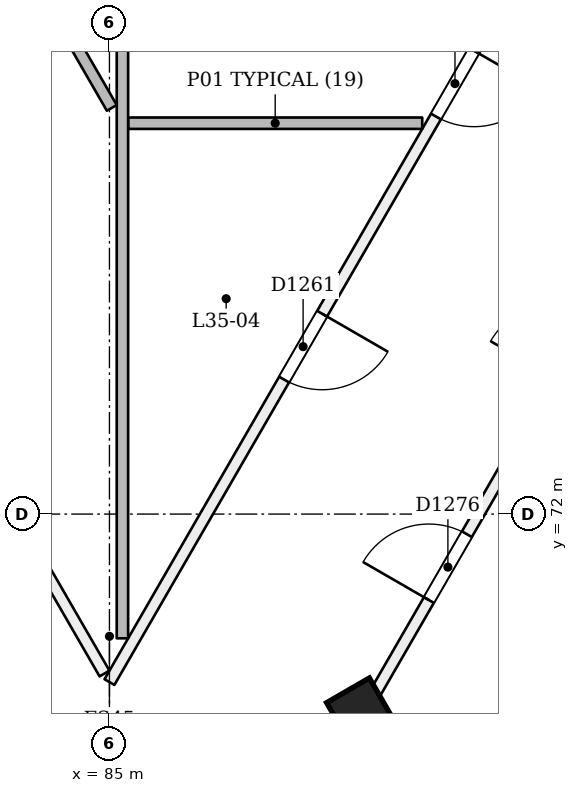
"""IFC4 building model, lengths in metres.
Left out: names, types, materials, properties, quantities, classifications, styles, units other than length and angle.
Written with IfcOpenShell. Run it as: python <this file> out.ifc"""

import sys

from ifc_helpers import new_model, si_unit, direction, frame, frame_2d, origin, origin_2d, place, context, subcontext, project, spatial, rectangle, extrude, element, fill, save


model = new_model("IFC4")
c1 = context("Model", 3, precision=1e-05, world=origin(), true_north=direction((0.0, 1.0)))
c2 = subcontext(c1, "Body", "Model", "MODEL_VIEW")
j1 = project(units=[si_unit("LENGTHUNIT", "METRE"), si_unit("PLANEANGLEUNIT", "RADIAN")], contexts=[c1])
p1 = place(None, origin())
s1 = spatial("IfcSite", under=j1, at=p1, CompositionType="ELEMENT")
p2 = place(p1, origin())
s2 = spatial("IfcBuilding", under=s1, at=p2, CompositionType="ELEMENT")
p3 = place(p2, frame((0.0, 0.0, 138.6)))
s3 = spatial("IfcBuildingStorey", under=s2, at=p3, CompositionType="ELEMENT", Elevation=138.6)
p4 = place(p3, frame((88.328, 69.353, -0.02), z_axis=(-0.022222852987, 0.038483477124, 0.999012095419), x_axis=(-0.500171952231, -0.865640981329, 0.022219577963)))
e1 = element("IfcColumn", 1, at=p4, inside=s3, PredefinedType="COLUMN", context=c2, shape_type="SweptSolid", body=[
    extrude(rectangle(XDim=0.65, YDim=0.65, at=origin_2d()), origin(), (0.0, 0.0, 1.0), 3.604),
])
p5 = place(p3, frame((84.935, 69.902, 0.0), z_axis=(0.0, 0.0, 1.0), x_axis=(-0.499997468525, 0.866026865327, 0.0)))
e2 = element("IfcWall", 2, at=p5, inside=s3, PredefinedType="PARTITIONING", context=c2, shape_type="SweptSolid", body=[
    extrude(rectangle(XDim=23.438, YDim=0.15, at=frame_2d((11.719, 0.0))), origin(), (0.0, 0.0, 1.0), 3.15),
])
p6 = place(p5, frame((8.864, 0.0, 0.0)))
e3 = element("IfcOpeningElement", 3, at=p6, cuts=e2, PredefinedType="OPENING", context=c2, shape_type="SweptSolid", body=[
    extrude(rectangle(XDim=0.9, YDim=2.1, at=frame_2d((0.45, 1.05))), frame((0.0, 0.085, 0.0), z_axis=(0.0, -1.0, 0.0), x_axis=(1.0, 0.0, 0.0)), (0.0, 0.0, 1.0), 0.171),
])
p7 = place(p5, frame((11.872, 0.0, 0.0)))
e4 = element("IfcOpeningElement", 4, at=p7, cuts=e2, PredefinedType="OPENING", context=c2, shape_type="SweptSolid", body=[
    extrude(rectangle(XDim=0.9, YDim=2.1, at=frame_2d((0.45, 1.05))), frame((0.0, 0.085, 0.0), z_axis=(0.0, -1.0, 0.0), x_axis=(1.0, 0.0, 0.0)), (0.0, 0.0, 1.0), 0.171),
])
p8 = place(p5, frame((4.368, 0.0, 0.0)))
e5 = element("IfcOpeningElement", 5, at=p8, cuts=e2, PredefinedType="OPENING", context=c2, shape_type="SweptSolid", body=[
    extrude(rectangle(XDim=1.2, YDim=2.1, at=frame_2d((0.6, 1.05))), frame((0.0, 0.085, 0.0), z_axis=(0.0, -1.0, 0.0), x_axis=(1.0, 0.0, 0.0)), (0.0, 0.0, 1.0), 0.171),
])
p9 = place(p5, frame((15.479, 0.0, 0.0)))
e6 = element("IfcOpeningElement", 6, at=p9, cuts=e2, PredefinedType="OPENING", context=c2, shape_type="SweptSolid", body=[
    extrude(rectangle(XDim=1.0, YDim=2.1, at=frame_2d((0.5, 1.05))), frame((0.0, 0.085, 0.0), z_axis=(0.0, -1.0, 0.0), x_axis=(1.0, 0.0, 0.0)), (0.0, 0.0, 1.0), 0.171),
])
p10 = place(p5, frame((19.877, 0.0, 0.0)))
e7 = element("IfcOpeningElement", 7, at=p10, cuts=e2, PredefinedType="OPENING", context=c2, shape_type="SweptSolid", body=[
    extrude(rectangle(XDim=1.0, YDim=2.1, at=frame_2d((0.5, 1.05))), frame((0.0, 0.085, 0.0), z_axis=(0.0, -1.0, 0.0), x_axis=(1.0, 0.0, 0.0)), (0.0, 0.0, 1.0), 0.171),
])
p11 = place(p3, frame((96.784, 90.2, 0.0), z_axis=(0.0, 0.0, 1.0), x_axis=(-0.499996251233, -0.866027568125, 0.0)))
e8 = element("IfcWall", 8, at=p11, inside=s3, PredefinedType="PARTITIONING", context=c2, shape_type="SweptSolid", body=[
    extrude(rectangle(XDim=23.568, YDim=0.15, at=frame_2d((11.784, 0.0))), origin(), (0.0, 0.0, 1.0), 3.15),
])
p12 = place(p11, frame((17.972, 0.0, 0.0)))
e9 = element("IfcOpeningElement", 9, at=p12, cuts=e8, PredefinedType="OPENING", context=c2, shape_type="SweptSolid", body=[
    extrude(rectangle(XDim=1.0, YDim=2.1, at=frame_2d((0.5, 1.05))), frame((0.0, 0.085, 0.0), z_axis=(0.0, -1.0, 0.0), x_axis=(1.0, 0.0, 0.0)), (0.0, 0.0, 1.0), 0.171),
])
p13 = place(p11, frame((13.976, 0.0, 0.0)))
e10 = element("IfcOpeningElement", 10, at=p13, cuts=e8, PredefinedType="OPENING", context=c2, shape_type="SweptSolid", body=[
    extrude(rectangle(XDim=1.0, YDim=2.1, at=frame_2d((0.5, 1.05))), frame((0.0, 0.085, 0.0), z_axis=(0.0, -1.0, 0.0), x_axis=(1.0, 0.0, 0.0)), (0.0, 0.0, 1.0), 0.171),
])
p14 = place(p11, frame((11.077, 0.0, 0.0)))
e11 = element("IfcOpeningElement", 11, at=p14, cuts=e8, PredefinedType="OPENING", context=c2, shape_type="SweptSolid", body=[
    extrude(rectangle(XDim=1.0, YDim=2.1, at=frame_2d((0.5, 1.05))), frame((0.0, 0.085, 0.0), z_axis=(0.0, -1.0, 0.0), x_axis=(1.0, 0.0, 0.0)), (0.0, 0.0, 1.0), 0.171),
])
p15 = place(p11, frame((7.656, 0.0, 0.0)))
e12 = element("IfcOpeningElement", 12, at=p15, cuts=e8, PredefinedType="OPENING", context=c2, shape_type="SweptSolid", body=[
    extrude(rectangle(XDim=1.0, YDim=2.1, at=frame_2d((0.5, 1.05))), frame((0.0, 0.085, 0.0), z_axis=(0.0, -1.0, 0.0), x_axis=(1.0, 0.0, 0.0)), (0.0, 0.0, 1.0), 0.171),
])
p16 = place(p11, frame((2.832, 0.0, 0.0)))
e13 = element("IfcOpeningElement", 13, at=p16, cuts=e8, PredefinedType="OPENING", context=c2, shape_type="SweptSolid", body=[
    extrude(rectangle(XDim=1.0, YDim=2.1, at=frame_2d((0.5, 1.05))), frame((0.0, 0.085, 0.0), z_axis=(0.0, -1.0, 0.0), x_axis=(1.0, 0.0, 0.0)), (0.0, 0.0, 1.0), 0.171),
])
p17 = place(p3, frame((64.899, 98.406, 0.0), z_axis=(0.0, 0.0, 1.0), x_axis=(0.499995137693, -0.86602821102, 0.0)))
e14 = element("IfcWall", 14, at=p17, inside=s3, PredefinedType="PARTITIONING", context=c2, shape_type="SweptSolid", body=[
    extrude(rectangle(XDim=40.094, YDim=0.15, at=frame_2d((20.047, 0.0))), origin(), (0.0, 0.0, 1.0), 2.75),
])
p18 = place(p17, frame((0.2, 0.0, 0.0)))
e15 = element("IfcOpeningElement", 15, at=p18, cuts=e14, PredefinedType="OPENING", context=c2, shape_type="SweptSolid", body=[
    extrude(rectangle(XDim=1.2, YDim=2.1, at=frame_2d((0.6, 1.05))), frame((0.0, 0.085, 0.0), z_axis=(0.0, -1.0, 0.0), x_axis=(1.0, 0.0, 0.0)), (0.0, 0.0, 1.0), 0.171),
])
p19 = place(p17, frame((9.442, 0.0, 0.0)))
e16 = element("IfcOpeningElement", 16, at=p19, cuts=e14, PredefinedType="OPENING", context=c2, shape_type="SweptSolid", body=[
    extrude(rectangle(XDim=1.0, YDim=2.1, at=frame_2d((0.5, 1.05))), frame((0.0, 0.085, 0.0), z_axis=(0.0, -1.0, 0.0), x_axis=(1.0, 0.0, 0.0)), (0.0, 0.0, 1.0), 0.171),
])
p20 = place(p17, frame((11.652, 0.0, 0.0)))
e17 = element("IfcOpeningElement", 17, at=p20, cuts=e14, PredefinedType="OPENING", context=c2, shape_type="SweptSolid", body=[
    extrude(rectangle(XDim=1.0, YDim=2.1, at=frame_2d((0.5, 1.05))), frame((0.0, 0.085, 0.0), z_axis=(0.0, -1.0, 0.0), x_axis=(1.0, 0.0, 0.0)), (0.0, 0.0, 1.0), 0.171),
])
p21 = place(p17, frame((19.447, 0.0, 0.0)))
e18 = element("IfcOpeningElement", 18, at=p21, cuts=e14, PredefinedType="OPENING", context=c2, shape_type="SweptSolid", body=[
    extrude(rectangle(XDim=1.2, YDim=2.1, at=frame_2d((0.6, 1.05))), frame((0.0, 0.085, 0.0), z_axis=(0.0, -1.0, 0.0), x_axis=(1.0, 0.0, 0.0)), (0.0, 0.0, 1.0), 0.171),
])
p22 = place(p17, frame((27.327, 0.0, 0.0)))
e19 = element("IfcOpeningElement", 19, at=p22, cuts=e14, PredefinedType="OPENING", context=c2, shape_type="SweptSolid", body=[
    extrude(rectangle(XDim=1.0, YDim=2.1, at=frame_2d((0.5, 1.05))), frame((0.0, 0.085, 0.0), z_axis=(0.0, -1.0, 0.0), x_axis=(1.0, 0.0, 0.0)), (0.0, 0.0, 1.0), 0.171),
])
p23 = place(p17, frame((31.847, 0.0, 0.0)))
e20 = element("IfcOpeningElement", 20, at=p23, cuts=e14, PredefinedType="OPENING", context=c2, shape_type="SweptSolid", body=[
    extrude(rectangle(XDim=1.2, YDim=2.1, at=frame_2d((0.6, 1.05))), frame((0.0, 0.085, 0.0), z_axis=(0.0, -1.0, 0.0), x_axis=(1.0, 0.0, 0.0)), (0.0, 0.0, 1.0), 0.171),
])
p24 = place(p17, frame((38.558, 0.0, 0.0)))
e21 = element("IfcOpeningElement", 21, at=p24, cuts=e14, PredefinedType="OPENING", context=c2, shape_type="SweptSolid", body=[
    extrude(rectangle(XDim=1.0, YDim=2.1, at=frame_2d((0.5, 1.05))), frame((0.0, 0.085, 0.0), z_axis=(0.0, -1.0, 0.0), x_axis=(1.0, 0.0, 0.0)), (0.0, 0.0, 1.0), 0.171),
])
p25 = place(p3, frame((85.054, 63.684, 0.0), z_axis=(0.0, 0.0, 1.0), x_axis=(0.499999704591, 0.866025574339, 0.0)))
e22 = element("IfcWall", 22, at=p25, inside=s3, PredefinedType="PARTITIONING", context=c2, shape_type="SweptSolid", body=[
    extrude(rectangle(XDim=40.094, YDim=0.15, at=frame_2d((20.047, 0.0))), origin(), (0.0, 0.0, 1.0), 2.75),
])
p26 = place(p25, frame((0.506, 0.0, 0.0)))
e23 = element("IfcOpeningElement", 23, at=p26, cuts=e22, PredefinedType="OPENING", context=c2, shape_type="SweptSolid", body=[
    extrude(rectangle(XDim=1.2, YDim=2.1, at=frame_2d((0.6, 1.05))), frame((0.0, 0.085, 0.0), z_axis=(0.0, -1.0, 0.0), x_axis=(1.0, 0.0, 0.0)), (0.0, 0.0, 1.0), 0.171),
])
p27 = place(p25, frame((2.767, 0.0, 0.0)))
e24 = element("IfcOpeningElement", 24, at=p27, cuts=e22, PredefinedType="OPENING", context=c2, shape_type="SweptSolid", body=[
    extrude(rectangle(XDim=1.0, YDim=2.1, at=frame_2d((0.5, 1.05))), frame((0.0, 0.085, 0.0), z_axis=(0.0, -1.0, 0.0), x_axis=(1.0, 0.0, 0.0)), (0.0, 0.0, 1.0), 0.171),
])
p28 = place(p25, frame((8.297, 0.0, 0.0)))
e25 = element("IfcOpeningElement", 25, at=p28, cuts=e22, PredefinedType="OPENING", context=c2, shape_type="SweptSolid", body=[
    extrude(rectangle(XDim=1.0, YDim=2.1, at=frame_2d((0.5, 1.05))), frame((0.0, 0.085, 0.0), z_axis=(0.0, -1.0, 0.0), x_axis=(1.0, 0.0, 0.0)), (0.0, 0.0, 1.0), 0.171),
])
p29 = place(p25, frame((11.652, 0.0, 0.0)))
e26 = element("IfcOpeningElement", 26, at=p29, cuts=e22, PredefinedType="OPENING", context=c2, shape_type="SweptSolid", body=[
    extrude(rectangle(XDim=1.0, YDim=2.1, at=frame_2d((0.5, 1.05))), frame((0.0, 0.085, 0.0), z_axis=(0.0, -1.0, 0.0), x_axis=(1.0, 0.0, 0.0)), (0.0, 0.0, 1.0), 0.171),
])
p30 = place(p25, frame((18.327, 0.0, 0.0)))
e27 = element("IfcOpeningElement", 27, at=p30, cuts=e22, PredefinedType="OPENING", context=c2, shape_type="SweptSolid", body=[
    extrude(rectangle(XDim=1.0, YDim=2.1, at=frame_2d((0.5, 1.05))), frame((0.0, 0.085, 0.0), z_axis=(0.0, -1.0, 0.0), x_axis=(1.0, 0.0, 0.0)), (0.0, 0.0, 1.0), 0.171),
])
p31 = place(p25, frame((20.767, 0.0, 0.0)))
e28 = element("IfcOpeningElement", 28, at=p31, cuts=e22, PredefinedType="OPENING", context=c2, shape_type="SweptSolid", body=[
    extrude(rectangle(XDim=1.0, YDim=2.1, at=frame_2d((0.5, 1.05))), frame((0.0, 0.085, 0.0), z_axis=(0.0, -1.0, 0.0), x_axis=(1.0, 0.0, 0.0)), (0.0, 0.0, 1.0), 0.171),
])
p32 = place(p25, frame((26.297, 0.0, 0.0)))
e29 = element("IfcOpeningElement", 29, at=p32, cuts=e22, PredefinedType="OPENING", context=c2, shape_type="SweptSolid", body=[
    extrude(rectangle(XDim=1.0, YDim=2.1, at=frame_2d((0.5, 1.05))), frame((0.0, 0.085, 0.0), z_axis=(0.0, -1.0, 0.0), x_axis=(1.0, 0.0, 0.0)), (0.0, 0.0, 1.0), 0.171),
])
p33 = place(p25, frame((31.847, 0.0, 0.0)))
e30 = element("IfcOpeningElement", 30, at=p33, cuts=e22, PredefinedType="OPENING", context=c2, shape_type="SweptSolid", body=[
    extrude(rectangle(XDim=1.2, YDim=2.1, at=frame_2d((0.6, 1.05))), frame((0.0, 0.085, 0.0), z_axis=(0.0, -1.0, 0.0), x_axis=(1.0, 0.0, 0.0)), (0.0, 0.0, 1.0), 0.171),
])
p34 = place(p25, frame((38.694, 0.0, 0.0)))
e31 = element("IfcOpeningElement", 31, at=p34, cuts=e22, PredefinedType="OPENING", context=c2, shape_type="SweptSolid", body=[
    extrude(rectangle(XDim=1.2, YDim=2.1, at=frame_2d((0.6, 1.05))), frame((0.0, 0.085, 0.0), z_axis=(0.0, -1.0, 0.0), x_axis=(1.0, 0.0, 0.0)), (0.0, 0.0, 1.0), 0.171),
])
p35 = place(p3, frame((81.095, 76.704, 0.0), z_axis=(0.0, 0.0, 1.0), x_axis=(0.866014403787, 0.50001905207, 0.0)))
e32 = element("IfcWall", 32, at=p35, inside=s3, PredefinedType="PARTITIONING", context=c2, shape_type="SweptSolid", body=[
    extrude(rectangle(XDim=3.729, YDim=0.1, at=frame_2d((1.864, 0.0))), origin(), (0.0, 0.0, 1.0), 3.15),
])
p36 = place(p3, frame((89.115, 77.142, 0.0), z_axis=(0.0, 0.0, 1.0), x_axis=(-1.0, 0.0, 0.0)))
e33 = element("IfcWall", 33, at=p36, inside=s3, PredefinedType="PARTITIONING", context=c2, shape_type="SweptSolid", body=[
    extrude(rectangle(XDim=3.869, YDim=0.15, at=frame_2d((1.935, 0.0))), origin(), (0.0, 0.0, 1.0), 3.15),
])
p37 = place(p3, frame((85.171, 81.824, 0.0), z_axis=(0.0, 0.0, 1.0), x_axis=(0.0, -1.0, 0.0)))
e34 = element("IfcWall", 34, at=p37, inside=s3, PredefinedType="PARTITIONING", context=c2, shape_type="SweptSolid", body=[
    extrude(rectangle(XDim=11.459, YDim=0.15, at=frame_2d((5.729, 0.0))), origin(), (0.0, 0.0, 1.0), 3.15),
])
p38 = place(p3, frame((84.324, 78.568, 0.0), z_axis=(0.0, 0.0, 1.0), x_axis=(0.499946688677, -0.866056180903, 0.0)))
e35 = element("IfcWall", 35, at=p38, inside=s3, PredefinedType="PARTITIONING", context=c2, shape_type="SweptSolid", body=[
    extrude(rectangle(XDim=1.414, YDim=0.15, at=frame_2d((0.707, 0.0))), origin(), (0.0, 0.0, 1.0), 3.15),
])
p39 = place(p12, origin())
e36 = element("IfcDoor", 36, at=p39, inside=s3, OperationType="SINGLE_SWING_LEFT", PredefinedType="NOTDEFINED", context=c2, shape_type="SweptSolid", body=[
    extrude(rectangle(XDim=1.0, YDim=2.1, at=frame_2d((0.5, 1.05))), frame((0.0, 0.025, 0.0), z_axis=(0.0, -1.0, 0.0), x_axis=(1.0, 0.0, 0.0)), (0.0, 0.0, 1.0), 0.05),
])
fill(e9, e36)
p40 = place(p13, origin())
e37 = element("IfcDoor", 37, at=p40, inside=s3, OperationType="SINGLE_SWING_LEFT", PredefinedType="NOTDEFINED", context=c2, shape_type="SweptSolid", body=[
    extrude(rectangle(XDim=1.0, YDim=2.1, at=frame_2d((0.5, 1.05))), frame((0.0, 0.025, 0.0), z_axis=(0.0, -1.0, 0.0), x_axis=(1.0, 0.0, 0.0)), (0.0, 0.0, 1.0), 0.05),
])
fill(e10, e37)
p41 = place(p28, origin())
e38 = element("IfcDoor", 38, at=p41, inside=s3, OperationType="SINGLE_SWING_LEFT", PredefinedType="NOTDEFINED", context=c2, shape_type="SweptSolid", body=[
    extrude(rectangle(XDim=1.0, YDim=2.1, at=frame_2d((0.5, 1.05))), frame((0.0, 0.025, 0.0), z_axis=(0.0, -1.0, 0.0), x_axis=(1.0, 0.0, 0.0)), (0.0, 0.0, 1.0), 0.05),
])
fill(e25, e38)
save(model, sys.argv[1])
